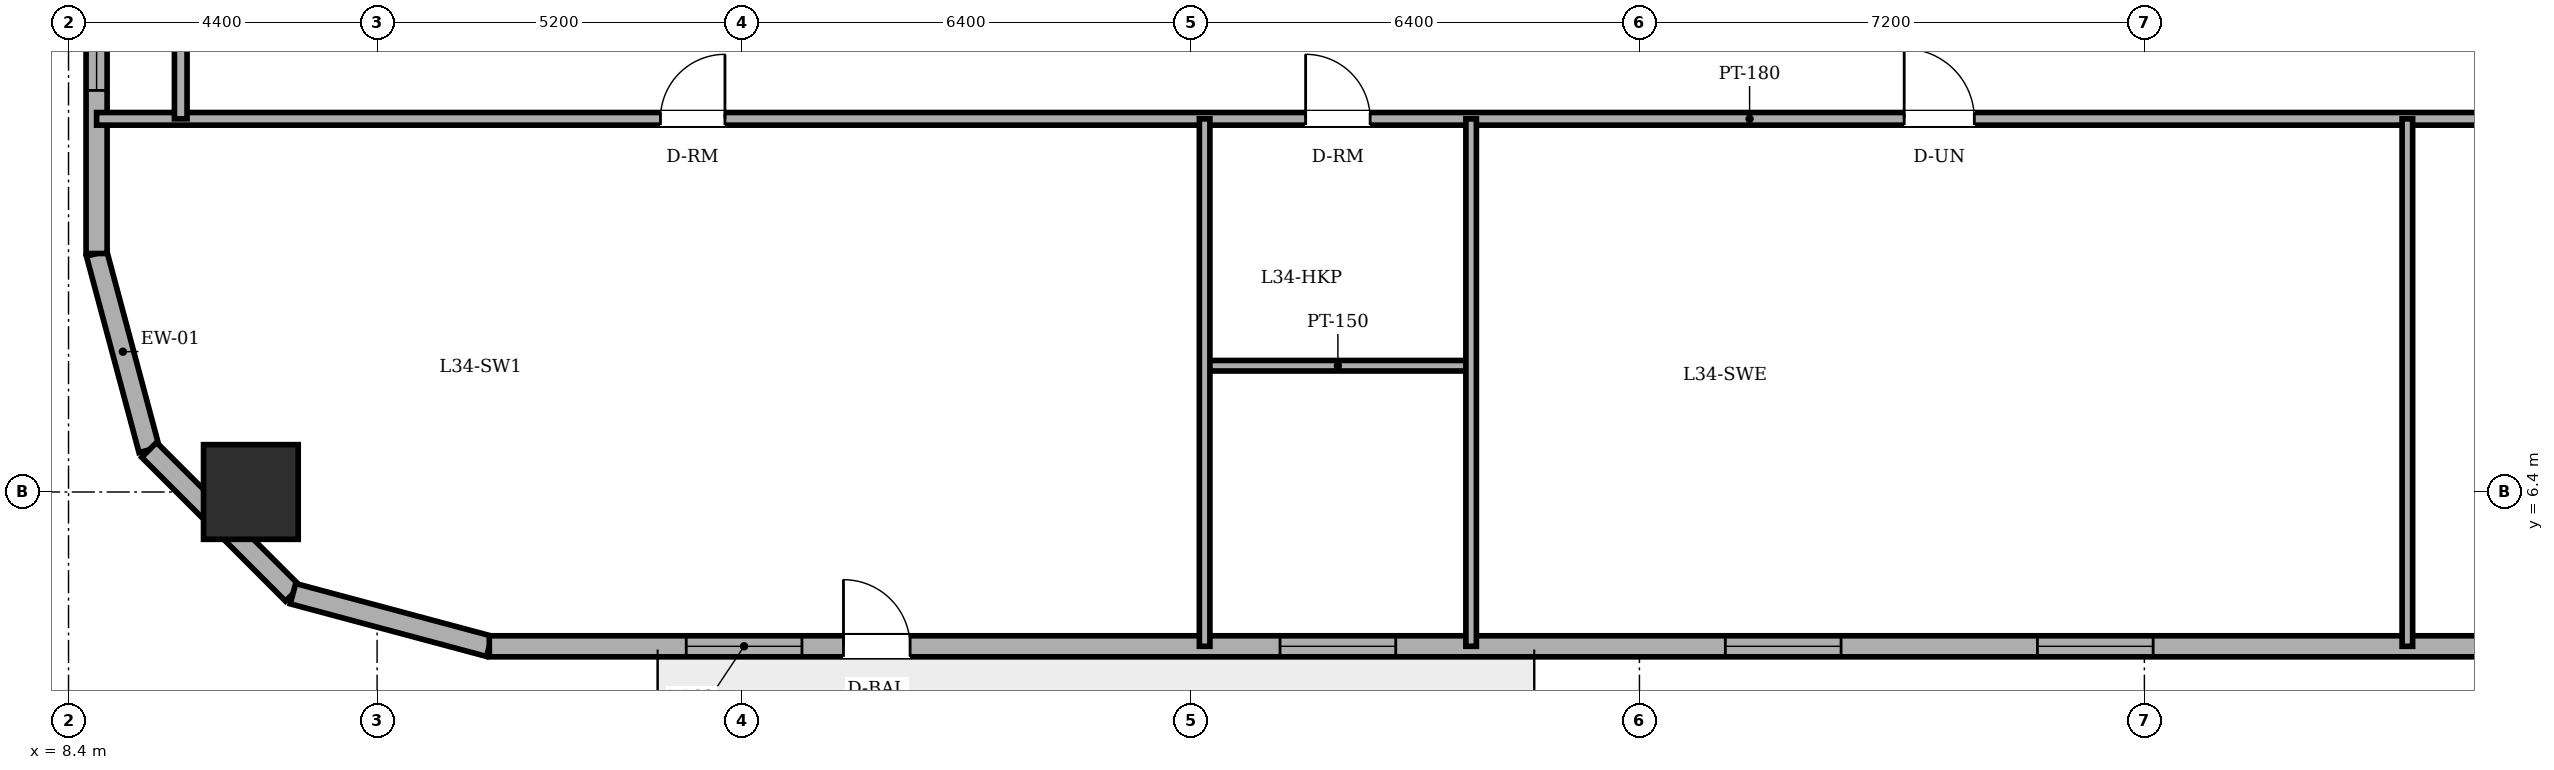
"""IFC4 building model, lengths in metres.
Left out: names, types, materials, properties, quantities, classifications, styles, units other than length and angle.
Written with IfcOpenShell. Run it as: python <this file> out.ifc"""

import sys

from ifc_helpers import new_model, si_unit, direction, frame, frame_2d, origin, origin_2d, place, context, subcontext, project, spatial, rectangle, circle, extrude, element, fill, save


model = new_model("IFC4")
c1 = context("Model", 3, precision=1e-05, world=origin(), true_north=direction((0.0, 1.0)))
c2 = subcontext(c1, "Body", "Model", "MODEL_VIEW")
j1 = project(units=[si_unit("LENGTHUNIT", "METRE"), si_unit("PLANEANGLEUNIT", "RADIAN")], contexts=[c1])
p1 = place(None, origin())
s1 = spatial("IfcSite", under=j1, at=p1, CompositionType="ELEMENT")
p2 = place(p1, origin())
s2 = spatial("IfcBuilding", under=s1, at=p2, CompositionType="ELEMENT")
p3 = place(p2, frame((0.0, 0.0, 129.5)))
s3 = spatial("IfcBuildingStorey", under=s2, at=p3, CompositionType="ELEMENT", Elevation=129.5)
p4 = place(p3, frame((11.0, 6.4, 0.0), z_axis=(0.0, 0.0, 1.0), x_axis=(1.0, 0.0, 0.0)))
e1 = element("IfcColumn", 1, at=p4, inside=s3, PredefinedType="COLUMN", context=c2, shape_type="SweptSolid", body=[
    extrude(circle(Radius=0.675, at=origin_2d()), origin(), (0.0, 0.0, 1.0), 3.6),
])
p5 = place(p3, frame((8.8, 9.8, 0.0), z_axis=(0.0, 0.0, 1.0), x_axis=(0.258731875344, -0.96594917914, 0.0)))
e2 = element("IfcWall", 2, at=p5, inside=s3, PredefinedType="SOLIDWALL", context=c2, shape_type="SweptSolid", body=[
    extrude(rectangle(XDim=2.899, YDim=0.3, at=frame_2d((1.449, 0.0))), origin(), (0.0, 0.0, 1.0), 3.36),
])
p6 = place(p3, frame((9.55, 7.0, 0.0), z_axis=(0.0, 0.0, 1.0), x_axis=(0.707106781187, -0.707106781187, 0.0)))
e3 = element("IfcWall", 3, at=p6, inside=s3, PredefinedType="SOLIDWALL", context=c2, shape_type="SweptSolid", body=[
    extrude(rectangle(XDim=2.899, YDim=0.3, at=frame_2d((1.45, 0.0))), origin(), (0.0, 0.0, 1.0), 3.36),
])
p7 = place(p3, frame((11.6, 4.95, 0.0), z_axis=(0.0, 0.0, 1.0), x_axis=(0.965943540406, -0.258752926066, 0.0)))
e4 = element("IfcWall", 4, at=p7, inside=s3, PredefinedType="SOLIDWALL", context=c2, shape_type="SweptSolid", body=[
    extrude(rectangle(XDim=2.898, YDim=0.3, at=frame_2d((1.449, 0.0))), origin(), (0.0, 0.0, 1.0), 3.36),
])
p8 = place(p3, frame((14.4, 4.2, 0.0), z_axis=(0.0, 0.0, 1.0), x_axis=(1.0, 0.0, 0.0)))
e5 = element("IfcWall", 5, at=p8, inside=s3, PredefinedType="SOLIDWALL", context=c2, shape_type="SweptSolid", body=[
    extrude(rectangle(XDim=29.933, YDim=0.3, at=frame_2d((14.967, 0.0))), origin(), (0.0, 0.0, 1.0), 3.36),
])
p9 = place(p8, frame((5.05, 0.0, 0.0)))
e6 = element("IfcOpeningElement", 6, at=p9, cuts=e5, PredefinedType="OPENING", context=c2, shape_type="SweptSolid", body=[
    extrude(rectangle(XDim=0.95, YDim=2.2, at=frame_2d((0.475, 1.1))), frame((0.0, 0.16, 0.0), z_axis=(0.0, -1.0, 0.0), x_axis=(1.0, 0.0, 0.0)), (0.0, 0.0, 1.0), 0.32),
])
p10 = place(p8, frame((2.808, 0.0, 0.85)))
e7 = element("IfcOpeningElement", 7, at=p10, cuts=e5, PredefinedType="OPENING", context=c2, shape_type="SweptSolid", body=[
    extrude(rectangle(XDim=1.65, YDim=1.55, at=frame_2d((0.825, 0.775))), frame((0.0, 0.16, 0.0), z_axis=(0.0, -1.0, 0.0), x_axis=(1.0, 0.0, 0.0)), (0.0, 0.0, 1.0), 0.32),
])
p11 = place(p8, frame((11.275, 0.0, 0.85)))
e8 = element("IfcOpeningElement", 8, at=p11, cuts=e5, PredefinedType="OPENING", context=c2, shape_type="SweptSolid", body=[
    extrude(rectangle(XDim=1.65, YDim=1.55, at=frame_2d((0.825, 0.775))), frame((0.0, 0.16, 0.0), z_axis=(0.0, -1.0, 0.0), x_axis=(1.0, 0.0, 0.0)), (0.0, 0.0, 1.0), 0.32),
])
p12 = place(p8, frame((17.625, 0.0, 0.85)))
e9 = element("IfcOpeningElement", 9, at=p12, cuts=e5, PredefinedType="OPENING", context=c2, shape_type="SweptSolid", body=[
    extrude(rectangle(XDim=1.65, YDim=1.55, at=frame_2d((0.825, 0.775))), frame((0.0, 0.16, 0.0), z_axis=(0.0, -1.0, 0.0), x_axis=(1.0, 0.0, 0.0)), (0.0, 0.0, 1.0), 0.32),
])
p13 = place(p8, frame((22.075, 0.0, 0.85)))
e10 = element("IfcOpeningElement", 10, at=p13, cuts=e5, PredefinedType="OPENING", context=c2, shape_type="SweptSolid", body=[
    extrude(rectangle(XDim=1.65, YDim=1.55, at=frame_2d((0.825, 0.775))), frame((0.0, 0.16, 0.0), z_axis=(0.0, -1.0, 0.0), x_axis=(1.0, 0.0, 0.0)), (0.0, 0.0, 1.0), 0.32),
])
p14 = place(p3, frame((8.8, 38.2, 0.0), z_axis=(0.0, 0.0, 1.0), x_axis=(0.0, -1.0, 0.0)))
e11 = element("IfcWall", 11, at=p14, inside=s3, PredefinedType="SOLIDWALL", context=c2, shape_type="SweptSolid", body=[
    extrude(rectangle(XDim=28.4, YDim=0.3, at=frame_2d((14.2, 0.0))), origin(), (0.0, 0.0, 1.0), 3.36),
])
p15 = place(p14, frame((2.325, 0.0, 0.85)))
e12 = element("IfcOpeningElement", 12, at=p15, cuts=e11, PredefinedType="OPENING", context=c2, shape_type="SweptSolid", body=[
    extrude(rectangle(XDim=1.65, YDim=1.55, at=frame_2d((0.825, 0.775))), frame((0.0, 0.16, 0.0), z_axis=(0.0, -1.0, 0.0), x_axis=(1.0, 0.0, 0.0)), (0.0, 0.0, 1.0), 0.32),
])
p16 = place(p14, frame((6.828, 0.0, 0.85)))
e13 = element("IfcOpeningElement", 13, at=p16, cuts=e11, PredefinedType="OPENING", context=c2, shape_type="SweptSolid", body=[
    extrude(rectangle(XDim=1.65, YDim=1.55, at=frame_2d((0.825, 0.775))), frame((0.0, 0.16, 0.0), z_axis=(0.0, -1.0, 0.0), x_axis=(1.0, 0.0, 0.0)), (0.0, 0.0, 1.0), 0.32),
])
p17 = place(p14, frame((10.102, 0.0, 0.85)))
e14 = element("IfcOpeningElement", 14, at=p17, cuts=e11, PredefinedType="OPENING", context=c2, shape_type="SweptSolid", body=[
    extrude(rectangle(XDim=1.65, YDim=1.55, at=frame_2d((0.825, 0.775))), frame((0.0, 0.16, 0.0), z_axis=(0.0, -1.0, 0.0), x_axis=(1.0, 0.0, 0.0)), (0.0, 0.0, 1.0), 0.32),
])
p18 = place(p14, frame((16.648, 0.0, 0.85)))
e15 = element("IfcOpeningElement", 15, at=p18, cuts=e11, PredefinedType="OPENING", context=c2, shape_type="SweptSolid", body=[
    extrude(rectangle(XDim=1.65, YDim=1.55, at=frame_2d((0.825, 0.775))), frame((0.0, 0.16, 0.0), z_axis=(0.0, -1.0, 0.0), x_axis=(1.0, 0.0, 0.0)), (0.0, 0.0, 1.0), 0.32),
])
p19 = place(p14, frame((19.922, 0.0, 0.85)))
e16 = element("IfcOpeningElement", 16, at=p19, cuts=e11, PredefinedType="OPENING", context=c2, shape_type="SweptSolid", body=[
    extrude(rectangle(XDim=1.65, YDim=1.55, at=frame_2d((0.825, 0.775))), frame((0.0, 0.16, 0.0), z_axis=(0.0, -1.0, 0.0), x_axis=(1.0, 0.0, 0.0)), (0.0, 0.0, 1.0), 0.32),
])
p20 = place(p14, frame((24.425, 0.0, 0.85)))
e17 = element("IfcOpeningElement", 17, at=p20, cuts=e11, PredefinedType="OPENING", context=c2, shape_type="SweptSolid", body=[
    extrude(rectangle(XDim=1.65, YDim=1.55, at=frame_2d((0.825, 0.775))), frame((0.0, 0.16, 0.0), z_axis=(0.0, -1.0, 0.0), x_axis=(1.0, 0.0, 0.0)), (0.0, 0.0, 1.0), 0.32),
])
p21 = place(p3, frame((24.6, 8.2, 0.0), z_axis=(0.0, 0.0, 1.0), x_axis=(1.0, 0.0, 0.0)))
e18 = element("IfcWall", 18, at=p21, inside=s3, PredefinedType="PARTITIONING", context=c2, shape_type="SweptSolid", body=[
    extrude(rectangle(XDim=3.8, YDim=0.15, at=frame_2d((1.9, 0.0))), origin(), (0.0, 0.0, 1.0), 3.36),
])
p22 = place(p3, frame((8.8, 11.72, 0.0), z_axis=(0.0, 0.0, 1.0), x_axis=(1.0, 0.0, 0.0)))
e19 = element("IfcWall", 19, at=p22, inside=s3, PredefinedType="PARTITIONING", context=c2, shape_type="SweptSolid", body=[
    extrude(rectangle(XDim=47.141, YDim=0.18, at=frame_2d((23.57, 0.0))), origin(), (0.0, 0.0, 1.0), 3.36),
])
p23 = place(p22, frame((17.24, 0.0, 0.0)))
e20 = element("IfcOpeningElement", 20, at=p23, cuts=e19, PredefinedType="OPENING", context=c2, shape_type="SweptSolid", body=[
    extrude(rectangle(XDim=0.92, YDim=2.1, at=frame_2d((0.46, 1.05))), frame((0.0, 0.1, 0.0), z_axis=(0.0, -1.0, 0.0), x_axis=(1.0, 0.0, 0.0)), (0.0, 0.0, 1.0), 0.2),
])
p24 = place(p22, frame((34.95, 0.0, 0.0)))
e21 = element("IfcOpeningElement", 21, at=p24, cuts=e19, PredefinedType="OPENING", context=c2, shape_type="SweptSolid", body=[
    extrude(rectangle(XDim=1.0, YDim=2.15, at=frame_2d((0.5, 1.075))), frame((0.0, 0.1, 0.0), z_axis=(0.0, -1.0, 0.0), x_axis=(1.0, 0.0, 0.0)), (0.0, 0.0, 1.0), 0.2),
])
p25 = place(p22, frame((8.04, 0.0, 0.0)))
e22 = element("IfcOpeningElement", 22, at=p25, cuts=e19, PredefinedType="OPENING", context=c2, shape_type="SweptSolid", body=[
    extrude(rectangle(XDim=0.92, YDim=2.1, at=frame_2d((0.46, 1.05))), frame((0.0, 0.1, 0.0), z_axis=(0.0, -1.0, 0.0), x_axis=(1.0, 0.0, 0.0)), (0.0, 0.0, 1.0), 0.2),
])
p26 = place(p22, frame((25.775, 0.0, 0.0)))
e23 = element("IfcOpeningElement", 23, at=p26, cuts=e19, PredefinedType="OPENING", context=c2, shape_type="SweptSolid", body=[
    extrude(rectangle(XDim=1.0, YDim=2.15, at=frame_2d((0.5, 1.075))), frame((0.0, 0.1, 0.0), z_axis=(0.0, -1.0, 0.0), x_axis=(1.0, 0.0, 0.0)), (0.0, 0.0, 1.0), 0.2),
])
p27 = place(p3, frame((10.0, 11.72, 0.0), z_axis=(0.0, 0.0, 1.0), x_axis=(0.0, 1.0, 0.0)))
e24 = element("IfcWall", 24, at=p27, inside=s3, PredefinedType="PARTITIONING", context=c2, shape_type="SweptSolid", body=[
    extrude(rectangle(XDim=2.46, YDim=0.18, at=frame_2d((1.23, 0.0))), origin(), (0.0, 0.0, 1.0), 3.36),
])
for number, where, z_axis, x_axis in (
    (25, (24.6, 4.2, 0.0), (0.0, 0.0, 1.0), (0.0, 1.0, 0.0)),
    (26, (28.4, 4.2, 0.0), (0.0, 0.0, 1.0), (0.0, 1.0, 0.0)),
    (27, (41.75, 4.2, 0.0), (0.0, 0.0, 1.0), (0.0, 1.0, 0.0)),
):
    element("IfcWall", number, at=place(p3, frame(where, z_axis=z_axis, x_axis=x_axis)), inside=s3, PredefinedType="PARTITIONING", context=c2, shape_type="SweptSolid", body=[
        extrude(rectangle(XDim=7.52, YDim=0.15, at=frame_2d((3.76, 0.0))), origin(), (0.0, 0.0, 1.0), 3.36),
    ])
p28 = place(p9, origin())
e28 = element("IfcDoor", 28, at=p28, inside=s3, OperationType="SINGLE_SWING_LEFT", PredefinedType="DOOR", context=c2, shape_type="SweptSolid", body=[
    extrude(rectangle(XDim=0.95, YDim=2.2, at=frame_2d((0.475, 1.1))), frame((0.0, 0.025, 0.0), z_axis=(0.0, -1.0, 0.0), x_axis=(1.0, 0.0, 0.0)), (0.0, 0.0, 1.0), 0.05),
])
fill(e6, e28)
p29 = place(p10, origin())
e29 = element("IfcWindow", 29, at=p29, inside=s3, PartitioningType="DOUBLE_PANEL_VERTICAL", PredefinedType="WINDOW", context=c2, shape_type="SweptSolid", body=[
    extrude(rectangle(XDim=1.65, YDim=1.55, at=frame_2d((0.825, 0.775))), frame((0.0, 0.03, 0.0), z_axis=(0.0, -1.0, 0.0), x_axis=(1.0, 0.0, 0.0)), (0.0, 0.0, 1.0), 0.06),
])
fill(e7, e29)
p30 = place(p11, origin())
e30 = element("IfcWindow", 30, at=p30, inside=s3, PartitioningType="DOUBLE_PANEL_VERTICAL", PredefinedType="WINDOW", context=c2, shape_type="SweptSolid", body=[
    extrude(rectangle(XDim=1.65, YDim=1.55, at=frame_2d((0.825, 0.775))), frame((0.0, 0.03, 0.0), z_axis=(0.0, -1.0, 0.0), x_axis=(1.0, 0.0, 0.0)), (0.0, 0.0, 1.0), 0.06),
])
fill(e8, e30)
p31 = place(p12, origin())
e31 = element("IfcWindow", 31, at=p31, inside=s3, PartitioningType="DOUBLE_PANEL_VERTICAL", PredefinedType="WINDOW", context=c2, shape_type="SweptSolid", body=[
    extrude(rectangle(XDim=1.65, YDim=1.55, at=frame_2d((0.825, 0.775))), frame((0.0, 0.03, 0.0), z_axis=(0.0, -1.0, 0.0), x_axis=(1.0, 0.0, 0.0)), (0.0, 0.0, 1.0), 0.06),
])
fill(e9, e31)
p32 = place(p13, origin())
e32 = element("IfcWindow", 32, at=p32, inside=s3, PartitioningType="DOUBLE_PANEL_VERTICAL", PredefinedType="WINDOW", context=c2, shape_type="SweptSolid", body=[
    extrude(rectangle(XDim=1.65, YDim=1.55, at=frame_2d((0.825, 0.775))), frame((0.0, 0.03, 0.0), z_axis=(0.0, -1.0, 0.0), x_axis=(1.0, 0.0, 0.0)), (0.0, 0.0, 1.0), 0.06),
])
fill(e10, e32)
p33 = place(p20, origin())
e33 = element("IfcWindow", 33, at=p33, inside=s3, PartitioningType="DOUBLE_PANEL_VERTICAL", PredefinedType="WINDOW", context=c2, shape_type="SweptSolid", body=[
    extrude(rectangle(XDim=1.65, YDim=1.55, at=frame_2d((0.825, 0.775))), frame((0.0, 0.03, 0.0), z_axis=(0.0, -1.0, 0.0), x_axis=(1.0, 0.0, 0.0)), (0.0, 0.0, 1.0), 0.06),
])
fill(e17, e33)
p34 = place(p23, origin())
e34 = element("IfcDoor", 34, at=p34, inside=s3, OperationType="SINGLE_SWING_LEFT", PredefinedType="DOOR", context=c2, shape_type="SweptSolid", body=[
    extrude(rectangle(XDim=0.92, YDim=2.1, at=frame_2d((0.46, 1.05))), frame((0.0, 0.025, 0.0), z_axis=(0.0, -1.0, 0.0), x_axis=(1.0, 0.0, 0.0)), (0.0, 0.0, 1.0), 0.05),
])
fill(e20, e34)
p35 = place(p25, origin())
e35 = element("IfcDoor", 35, at=p35, inside=s3, OperationType="SINGLE_SWING_RIGHT", PredefinedType="DOOR", context=c2, shape_type="SweptSolid", body=[
    extrude(rectangle(XDim=0.92, YDim=2.1, at=frame_2d((0.46, 1.05))), frame((0.0, 0.025, 0.0), z_axis=(0.0, -1.0, 0.0), x_axis=(1.0, 0.0, 0.0)), (0.0, 0.0, 1.0), 0.05),
])
fill(e22, e35)
p36 = place(p26, origin())
e36 = element("IfcDoor", 36, at=p36, inside=s3, OperationType="SINGLE_SWING_LEFT", PredefinedType="DOOR", context=c2, shape_type="SweptSolid", body=[
    extrude(rectangle(XDim=1.0, YDim=2.15, at=frame_2d((0.5, 1.075))), frame((0.0, 0.025, 0.0), z_axis=(0.0, -1.0, 0.0), x_axis=(1.0, 0.0, 0.0)), (0.0, 0.0, 1.0), 0.05),
])
fill(e23, e36)
save(model, sys.argv[1])
